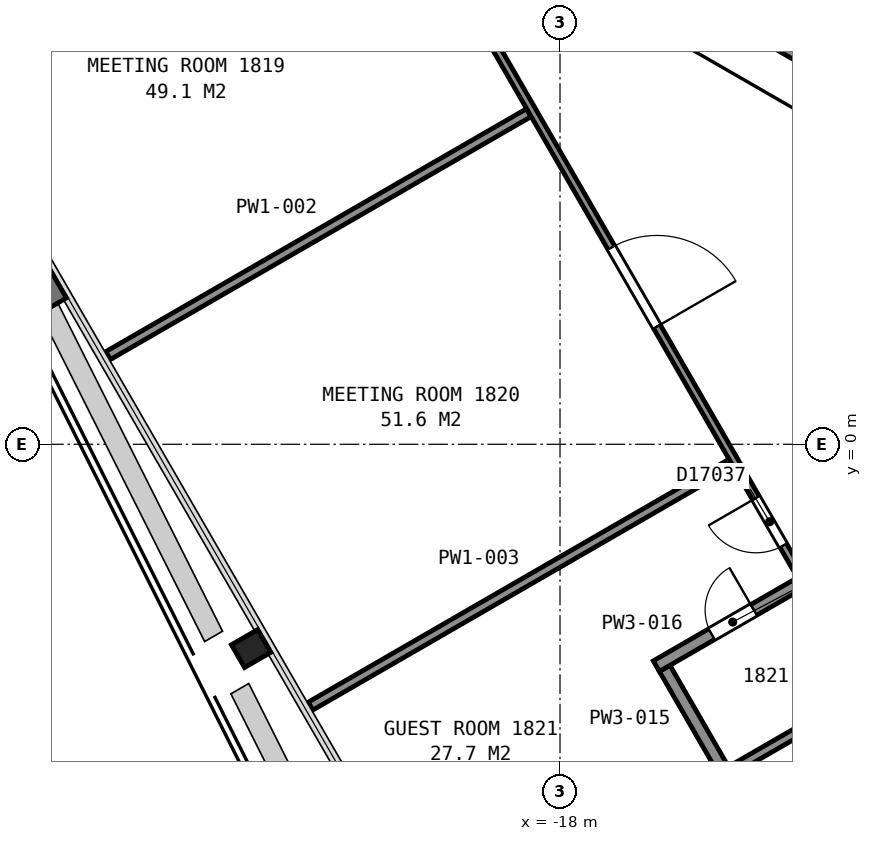
"""IFC4 building model, lengths in metres.
Left out: names, types, materials, properties, quantities, classifications, styles, units other than length and angle.
Written with IfcOpenShell. Run it as: python <this file> out.ifc"""

import sys

from ifc_helpers import new_model, si_unit, direction, frame, frame_2d, origin, origin_2d, place, context, subcontext, project, spatial, rectangle, i_section, extrude, element, fill, save


model = new_model("IFC4")
c1 = context("Model", 3, precision=1e-05, world=origin(), true_north=direction((0.0, 1.0)))
c2 = subcontext(c1, "Body", "Model", "MODEL_VIEW")
j1 = project(units=[si_unit("LENGTHUNIT", "METRE"), si_unit("PLANEANGLEUNIT", "RADIAN")], contexts=[c1])
p1 = place(None, origin())
s1 = spatial("IfcSite", under=j1, at=p1, CompositionType="ELEMENT")
p2 = place(p1, origin())
s2 = spatial("IfcBuilding", under=s1, at=p2, CompositionType="ELEMENT")
p3 = place(p2, frame((0.0, 0.0, 80.0)))
s3 = spatial("IfcBuildingStorey", under=s2, at=p3, CompositionType="ELEMENT", Elevation=80.0)
p4 = place(p3, frame((-23.08, -3.36, 0.0), z_axis=(0.0, 0.0, 1.0), x_axis=(-0.5, 0.866025403784, 0.0)))
e1 = element("IfcColumn", 1, at=p4, inside=s3, PredefinedType="COLUMN", context=c2, shape_type="SweptSolid", body=[
    extrude(i_section(OverallWidth=0.432, OverallDepth=0.498, WebThickness=0.056, FlangeThickness=0.089, FilletRadius=0.015, at=origin_2d()), origin(), (0.0, 0.0, 1.0), 3.6),
])
for number, where, z_axis, x_axis in (
    (2, (-7.678, 2.701, 0.0), (0.0, 0.0, 1.0), (-0.866, 0.5, 0.0)),
    (3, (-6.178, 5.299, 0.0), (0.0, 0.0, 1.0), (-0.866, 0.5, 0.0)),
):
    element("IfcWall", number, at=place(p3, frame(where, z_axis=z_axis, x_axis=x_axis)), inside=s3, PredefinedType="PARTITIONING", context=c2, shape_type="SweptSolid", body=[
        extrude(rectangle(XDim=12.0, YDim=0.2, at=frame_2d((6.0, 0.0))), origin(), (0.0, 0.0, 1.0), 3.35),
    ])
p5 = place(p3, frame((-25.432, 1.459, 0.0), z_axis=(0.0, 0.0, 1.0), x_axis=(0.866052736899, 0.499952654668, 0.0)))
e4 = element("IfcWall", 4, at=p5, inside=s3, PredefinedType="PARTITIONING", context=c2, shape_type="SweptSolid", body=[
    extrude(rectangle(XDim=7.987, YDim=0.15, at=frame_2d((3.994, 0.0))), origin(), (0.0, 0.0, 1.0), 2.613),
])
p6 = place(p3, frame((-22.103, -4.306, 0.0), z_axis=(0.0, 0.0, 1.0), x_axis=(0.866016576429, 0.500015289116, 0.0)))
e5 = element("IfcWall", 5, at=p6, inside=s3, PredefinedType="PARTITIONING", context=c2, shape_type="SweptSolid", body=[
    extrude(rectangle(XDim=7.987, YDim=0.15, at=frame_2d((3.993, 0.0))), origin(), (0.0, 0.0, 1.0), 2.613),
])
p7 = place(p3, frame((-19.916, -8.095, 0.0), z_axis=(0.0, 0.0, 1.0), x_axis=(0.865953574939, 0.500124390578, 0.0)))
e6 = element("IfcWall", 6, at=p7, inside=s3, PredefinedType="PARTITIONING", context=c2, shape_type="SweptSolid", body=[
    extrude(rectangle(XDim=7.992, YDim=0.15, at=frame_2d((3.996, 0.0))), origin(), (0.0, 0.0, 1.0), 2.613),
])
p8 = place(p3, frame((-3.766, -19.958, 0.0), z_axis=(0.0, 0.0, 1.0), x_axis=(-0.50002170027, 0.866012874765, 0.0)))
e7 = element("IfcWall", 7, at=p8, inside=s3, PredefinedType="PARTITIONING", context=c2, shape_type="SweptSolid", body=[
    extrude(rectangle(XDim=31.379, YDim=0.125, at=frame_2d((15.69, 0.0))), origin(), (0.0, 0.0, 1.0), 2.613),
])
p9 = place(p8, frame((25.28, 0.0, 0.0)))
e8 = element("IfcOpeningElement", 8, at=p9, cuts=e7, PredefinedType="OPENING", context=c2, shape_type="SweptSolid", body=[
    extrude(rectangle(XDim=1.5, YDim=2.1, at=frame_2d((0.75, 1.05))), frame((0.0, 0.073, 0.0), z_axis=(0.0, -1.0, 0.0), x_axis=(1.0, 0.0, 0.0)), (0.0, 0.0, 1.0), 0.145),
])
p10 = place(p8, frame((21.124, 0.0, 0.0)))
e9 = element("IfcOpeningElement", 9, at=p10, cuts=e7, PredefinedType="OPENING", context=c2, shape_type="SweptSolid", body=[
    extrude(rectangle(XDim=0.9, YDim=2.1, at=frame_2d((0.45, 1.05))), frame((0.0, 0.073, 0.0), z_axis=(0.0, -1.0, 0.0), x_axis=(1.0, 0.0, 0.0)), (0.0, 0.0, 1.0), 0.145),
])
p11 = place(p8, frame((14.349, 0.0, 0.0)))
e10 = element("IfcOpeningElement", 10, at=p11, cuts=e7, PredefinedType="OPENING", context=c2, shape_type="SweptSolid", body=[
    extrude(rectangle(XDim=0.9, YDim=2.1, at=frame_2d((0.45, 1.05))), frame((0.0, 0.073, 0.0), z_axis=(0.0, -1.0, 0.0), x_axis=(1.0, 0.0, 0.0)), (0.0, 0.0, 1.0), 0.145),
])
p12 = place(p8, frame((11.804, 0.0, 0.0)))
e11 = element("IfcOpeningElement", 11, at=p12, cuts=e7, PredefinedType="OPENING", context=c2, shape_type="SweptSolid", body=[
    extrude(rectangle(XDim=0.9, YDim=2.1, at=frame_2d((0.45, 1.05))), frame((0.0, 0.073, 0.0), z_axis=(0.0, -1.0, 0.0), x_axis=(1.0, 0.0, 0.0)), (0.0, 0.0, 1.0), 0.145),
])
p13 = place(p8, frame((5.33, 0.0, 0.0)))
e12 = element("IfcOpeningElement", 12, at=p13, cuts=e7, PredefinedType="OPENING", context=c2, shape_type="SweptSolid", body=[
    extrude(rectangle(XDim=0.9, YDim=2.1, at=frame_2d((0.45, 1.05))), frame((0.0, 0.073, 0.0), z_axis=(0.0, -1.0, 0.0), x_axis=(1.0, 0.0, 0.0)), (0.0, 0.0, 1.0), 0.145),
])
p14 = place(p8, frame((2.906, 0.0, 0.0)))
e13 = element("IfcOpeningElement", 13, at=p14, cuts=e7, PredefinedType="OPENING", context=c2, shape_type="SweptSolid", body=[
    extrude(rectangle(XDim=1.0, YDim=2.1, at=frame_2d((0.5, 1.05))), frame((0.0, 0.073, 0.0), z_axis=(0.0, -1.0, 0.0), x_axis=(1.0, 0.0, 0.0)), (0.0, 0.0, 1.0), 0.145),
])
p15 = place(p3, frame((-16.279, -3.686, 0.0), z_axis=(0.0, 0.0, 1.0), x_axis=(0.500190942922, -0.865915134767, 0.0)))
e14 = element("IfcWall", 14, at=p15, inside=s3, PredefinedType="PARTITIONING", context=c2, shape_type="SweptSolid", body=[
    extrude(rectangle(XDim=1.925, YDim=0.2, at=frame_2d((0.962, 0.0))), origin(), (0.0, 0.0, 1.0), 2.613),
])
p16 = place(p3, frame((-14.045, -2.28, 0.0), z_axis=(0.0, 0.0, 1.0), x_axis=(-0.866005850709, -0.50003386539, 0.0)))
e15 = element("IfcWall", 15, at=p16, inside=s3, PredefinedType="PARTITIONING", context=c2, shape_type="SweptSolid", body=[
    extrude(rectangle(XDim=2.737, YDim=0.2, at=frame_2d((1.369, 0.0))), origin(), (0.0, 0.0, 1.0), 2.613),
])
p17 = place(p16, frame((0.887, 0.0, 0.0)))
e16 = element("IfcOpeningElement", 16, at=p17, cuts=e15, PredefinedType="OPENING", context=c2, shape_type="SweptSolid", body=[
    extrude(rectangle(XDim=0.8, YDim=2.1, at=frame_2d((0.4, 1.05))), frame((0.0, 0.11, 0.0), z_axis=(0.0, -1.0, 0.0), x_axis=(1.0, 0.0, 0.0)), (0.0, 0.0, 1.0), 0.22),
])
p18 = place(p9, origin())
e17 = element("IfcDoor", 17, at=p18, inside=s3, OperationType="DOUBLE_DOOR_SINGLE_SWING", PredefinedType="DOOR", context=c2, shape_type="SweptSolid", body=[
    extrude(rectangle(XDim=1.5, YDim=2.1, at=frame_2d((0.75, 1.05))), frame((0.0, 0.025, 0.0), z_axis=(0.0, -1.0, 0.0), x_axis=(1.0, 0.0, 0.0)), (0.0, 0.0, 1.0), 0.05),
])
fill(e8, e17)
p19 = place(p10, origin())
e18 = element("IfcDoor", 18, at=p19, inside=s3, OperationType="SINGLE_SWING_RIGHT", PredefinedType="DOOR", context=c2, shape_type="SweptSolid", body=[
    extrude(rectangle(XDim=0.9, YDim=2.1, at=frame_2d((0.45, 1.05))), frame((0.0, 0.025, 0.0), z_axis=(0.0, -1.0, 0.0), x_axis=(1.0, 0.0, 0.0)), (0.0, 0.0, 1.0), 0.05),
])
fill(e9, e18)
p20 = place(p17, origin())
e19 = element("IfcDoor", 19, at=p20, inside=s3, OperationType="SINGLE_SWING_LEFT", PredefinedType="DOOR", context=c2, shape_type="SweptSolid", body=[
    extrude(rectangle(XDim=0.8, YDim=2.1, at=frame_2d((0.4, 1.05))), frame((0.0, 0.025, 0.0), z_axis=(0.0, -1.0, 0.0), x_axis=(1.0, 0.0, 0.0)), (0.0, 0.0, 1.0), 0.05),
])
fill(e16, e19)
save(model, sys.argv[1])
